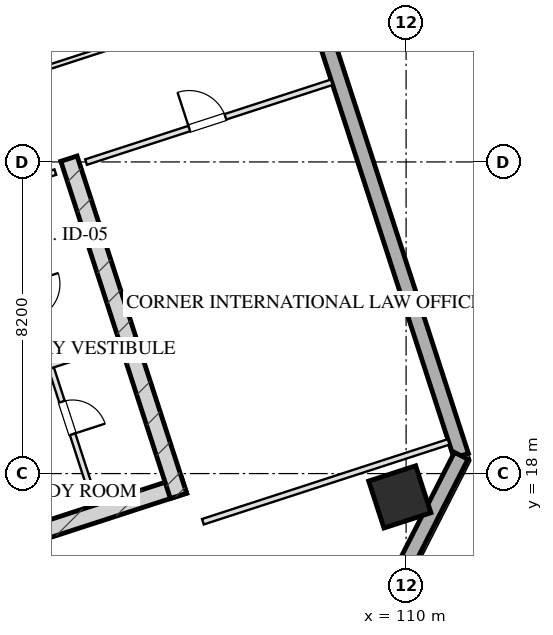
"""IFC4 building model, lengths in metres.
Left out: names, types, materials, properties, quantities, classifications, styles, units other than length and angle.
Written with IfcOpenShell. Run it as: python <this file> out.ifc"""

import sys

from ifc_helpers import new_model, si_unit, direction, frame, frame_2d, origin, origin_2d, place, context, subcontext, project, spatial, rectangle, hollow_rectangle, extrude, element, fill, save


model = new_model("IFC4")
c1 = context("Model", 3, precision=1e-05, world=origin(), true_north=direction((0.0, 1.0)))
c2 = subcontext(c1, "Body", "Model", "MODEL_VIEW")
j1 = project(units=[si_unit("LENGTHUNIT", "METRE"), si_unit("PLANEANGLEUNIT", "RADIAN")], contexts=[c1])
p1 = place(None, origin())
s1 = spatial("IfcSite", under=j1, at=p1, CompositionType="ELEMENT")
p2 = place(p1, origin())
s2 = spatial("IfcBuilding", under=s1, at=p2, CompositionType="ELEMENT")
p3 = place(p2, frame((0.0, 0.0, 188.6)))
s3 = spatial("IfcBuildingStorey", under=s2, at=p3, CompositionType="ELEMENT", Elevation=188.6)
p4 = place(p3, frame((88.701, 12.675, 0.0), z_axis=(0.0, 0.0, 1.0), x_axis=(0.95105824505, 0.309011673763, 0.0)))
e1 = element("IfcWall", 1, at=p4, inside=s3, PredefinedType="SHEAR", context=c2, shape_type="SweptSolid", body=[
    extrude(rectangle(XDim=16.25, YDim=0.45, at=frame_2d((8.125, 0.0))), origin(), (0.0, 0.0, 1.0), 3.45),
])
p5 = place(p3, frame((101.128, 26.286, 0.0), z_axis=(0.0, 0.0, 1.0), x_axis=(0.309004419953, -0.951060601881, 0.0)))
e2 = element("IfcWall", 2, at=p5, inside=s3, PredefinedType="SHEAR", context=c2, shape_type="SweptSolid", body=[
    extrude(rectangle(XDim=9.33, YDim=0.45, at=frame_2d((4.665, 0.0))), origin(), (0.0, 0.0, 1.0), 3.45),
])
p6 = place(p3, frame((109.835, 17.386, 0.0), z_axis=(0.0, 0.0, 1.0), x_axis=(0.951056516295, 0.309016994375, 0.0)))
e3 = element("IfcColumn", 3, at=p6, inside=s3, PredefinedType="COLUMN", context=c2, shape_type="SweptSolid", body=[
    extrude(hollow_rectangle(XDim=1.3, YDim=1.3, WallThickness=0.045, at=origin_2d()), origin(), (0.0, 0.0, 1.0), 3.451),
])
p7 = place(p3, frame((98.224, 59.173, 0.0), z_axis=(0.0, 0.0, 1.0), x_axis=(0.309014228706, -0.951057414911, 0.0)))
e4 = element("IfcWall", 4, at=p7, inside=s3, PredefinedType="SOLIDWALL", context=c2, shape_type="SweptSolid", body=[
    extrude(rectangle(XDim=42.8, YDim=0.4, at=frame_2d((21.4, 0.0))), origin(), (0.0, 0.0, 1.0), 2.61),
])
p8 = place(p7, frame((17.75, 0.0, 0.75)))
e5 = element("IfcOpeningElement", 5, at=p8, cuts=e4, PredefinedType="OPENING", context=c2, shape_type="SweptSolid", body=[
    extrude(rectangle(XDim=2.1, YDim=1.46, at=frame_2d((1.05, 0.73))), frame((0.0, 0.21, 0.0), z_axis=(0.0, -1.0, 0.0), x_axis=(1.0, 0.0, 0.0)), (0.0, 0.0, 1.0), 0.42),
])
p9 = place(p7, frame((13.95, 0.0, 0.75)))
e6 = element("IfcOpeningElement", 6, at=p9, cuts=e4, PredefinedType="OPENING", context=c2, shape_type="SweptSolid", body=[
    extrude(rectangle(XDim=2.1, YDim=1.46, at=frame_2d((1.05, 0.73))), frame((0.0, 0.21, 0.0), z_axis=(0.0, -1.0, 0.0), x_axis=(1.0, 0.0, 0.0)), (0.0, 0.0, 1.0), 0.42),
])
p10 = place(p7, frame((23.95, 0.0, 0.0)))
e7 = element("IfcOpeningElement", 7, at=p10, cuts=e4, PredefinedType="OPENING", context=c2, shape_type="SweptSolid", body=[
    extrude(rectangle(XDim=1.1, YDim=2.15, at=frame_2d((0.55, 1.075))), frame((0.0, 0.21, 0.0), z_axis=(0.0, -1.0, 0.0), x_axis=(1.0, 0.0, 0.0)), (0.0, 0.0, 1.0), 0.42),
])
p11 = place(p3, frame((111.449, 18.468, 0.0), z_axis=(0.0, 0.0, 1.0), x_axis=(-0.454019523198, -0.890991735402, 0.0)))
e8 = element("IfcWall", 8, at=p11, inside=s3, PredefinedType="SOLIDWALL", context=c2, shape_type="SweptSolid", body=[
    extrude(rectangle(XDim=3.394, YDim=0.4, at=frame_2d((1.697, 0.0))), origin(), (0.0, 0.0, 1.0), 2.61),
])
p12 = place(p3, frame((97.727, 24.944, 0.0), z_axis=(0.0, 0.0, 1.0), x_axis=(0.951036872128, 0.309077446369, 0.0)))
e9 = element("IfcWall", 9, at=p12, inside=s3, PredefinedType="PARTITIONING", context=c2, shape_type="SweptSolid", body=[
    extrude(rectangle(XDim=3.2, YDim=0.15, at=frame_2d((1.6, 0.0))), origin(), (0.0, 0.0, 1.0), 3.175),
])
p13 = place(p12, frame((0.22, 0.0, 0.0)))
e10 = element("IfcOpeningElement", 10, at=p13, cuts=e9, PredefinedType="OPENING", context=c2, shape_type="SweptSolid", body=[
    extrude(rectangle(XDim=0.95, YDim=2.05, at=frame_2d((0.475, 1.025))), frame((0.0, 0.085, 0.0), z_axis=(0.0, -1.0, 0.0), x_axis=(1.0, 0.0, 0.0)), (0.0, 0.0, 1.0), 0.17),
])
p14 = place(p3, frame((99.153, 25.408, 0.0), z_axis=(0.0, 0.0, 1.0), x_axis=(0.309016001439, -0.951056838919, 0.0)))
e11 = element("IfcWall", 11, at=p14, inside=s3, PredefinedType="PARTITIONING", context=c2, shape_type="SweptSolid", body=[
    extrude(rectangle(XDim=8.43, YDim=0.15, at=frame_2d((4.215, 0.0))), origin(), (0.0, 0.0, 1.0), 3.175),
])
p15 = place(p14, frame((2.55, 0.0, 0.0)))
e12 = element("IfcOpeningElement", 12, at=p15, cuts=e11, PredefinedType="OPENING", context=c2, shape_type="SweptSolid", body=[
    extrude(rectangle(XDim=0.95, YDim=2.05, at=frame_2d((0.475, 1.025))), frame((0.0, 0.085, 0.0), z_axis=(0.0, -1.0, 0.0), x_axis=(1.0, 0.0, 0.0)), (0.0, 0.0, 1.0), 0.17),
])
p16 = place(p14, frame((5.8, 0.0, 0.0)))
e13 = element("IfcOpeningElement", 13, at=p16, cuts=e11, PredefinedType="OPENING", context=c2, shape_type="SweptSolid", body=[
    extrude(rectangle(XDim=0.9, YDim=2.05, at=frame_2d((0.45, 1.025))), frame((0.0, 0.085, 0.0), z_axis=(0.0, -1.0, 0.0), x_axis=(1.0, 0.0, 0.0)), (0.0, 0.0, 1.0), 0.17),
])
p17 = place(p3, frame((100.636, 20.843, 0.0), z_axis=(0.0, 0.0, 1.0), x_axis=(0.951040401051, 0.309066587596, 0.0)))
e14 = element("IfcWall", 14, at=p17, inside=s3, PredefinedType="PARTITIONING", context=c2, shape_type="SweptSolid", body=[
    extrude(rectangle(XDim=1.7, YDim=0.15, at=frame_2d((0.85, 0.0))), origin(), (0.0, 0.0, 1.0), 3.175),
])
p18 = place(p3, frame((104.653, 16.733, 0.0), z_axis=(0.0, 0.0, 1.0), x_axis=(0.951054383043, 0.309023559774, 0.0)))
e15 = element("IfcWall", 15, at=p18, inside=s3, PredefinedType="PARTITIONING", context=c2, shape_type="SweptSolid", body=[
    extrude(rectangle(XDim=6.8, YDim=0.15, at=frame_2d((3.4, 0.0))), origin(), (0.0, 0.0, 1.0), 3.175),
])
p19 = place(p3, frame((101.578, 26.196, 0.0), z_axis=(0.0, 0.0, 1.0), x_axis=(0.951064934653, 0.308991084134, 0.0)))
e16 = element("IfcWall", 16, at=p19, inside=s3, PredefinedType="PARTITIONING", context=c2, shape_type="SweptSolid", body=[
    extrude(rectangle(XDim=6.8, YDim=0.15, at=frame_2d((3.4, 0.0))), origin(), (0.0, 0.0, 1.0), 3.175),
])
p20 = place(p19, frame((2.856, 0.0, 0.0)))
e17 = element("IfcOpeningElement", 17, at=p20, cuts=e16, PredefinedType="OPENING", context=c2, shape_type="SweptSolid", body=[
    extrude(rectangle(XDim=1.0, YDim=2.05, at=frame_2d((0.5, 1.025))), frame((0.0, 0.085, 0.0), z_axis=(0.0, -1.0, 0.0), x_axis=(1.0, 0.0, 0.0)), (0.0, 0.0, 1.0), 0.17),
])
p21 = place(p3, frame((95.852, 27.153, 0.0), z_axis=(0.0, 0.0, 1.0), x_axis=(0.951054485045, 0.30902324585, 0.0)))
e18 = element("IfcWall", 18, at=p21, inside=s3, PredefinedType="PARTITIONING", context=c2, shape_type="SweptSolid", body=[
    extrude(rectangle(XDim=11.95, YDim=0.12, at=frame_2d((5.975, 0.0))), origin(), (0.0, 0.0, 1.0), 3.175),
])
p22 = place(p16, origin())
e19 = element("IfcDoor", 19, at=p22, inside=s3, OperationType="SINGLE_SWING_RIGHT", PredefinedType="DOOR", context=c2, shape_type="SweptSolid", body=[
    extrude(rectangle(XDim=0.9, YDim=2.05, at=frame_2d((0.45, 1.025))), frame((0.0, 0.025, 0.0), z_axis=(0.0, -1.0, 0.0), x_axis=(1.0, 0.0, 0.0)), (0.0, 0.0, 1.0), 0.05),
])
fill(e13, e19)
p23 = place(p20, origin())
e20 = element("IfcDoor", 20, at=p23, inside=s3, OperationType="SINGLE_SWING_LEFT", PredefinedType="DOOR", context=c2, shape_type="SweptSolid", body=[
    extrude(rectangle(XDim=1.0, YDim=2.05, at=frame_2d((0.5, 1.025))), frame((0.0, 0.025, 0.0), z_axis=(0.0, -1.0, 0.0), x_axis=(1.0, 0.0, 0.0)), (0.0, 0.0, 1.0), 0.05),
])
fill(e17, e20)
save(model, sys.argv[1])
